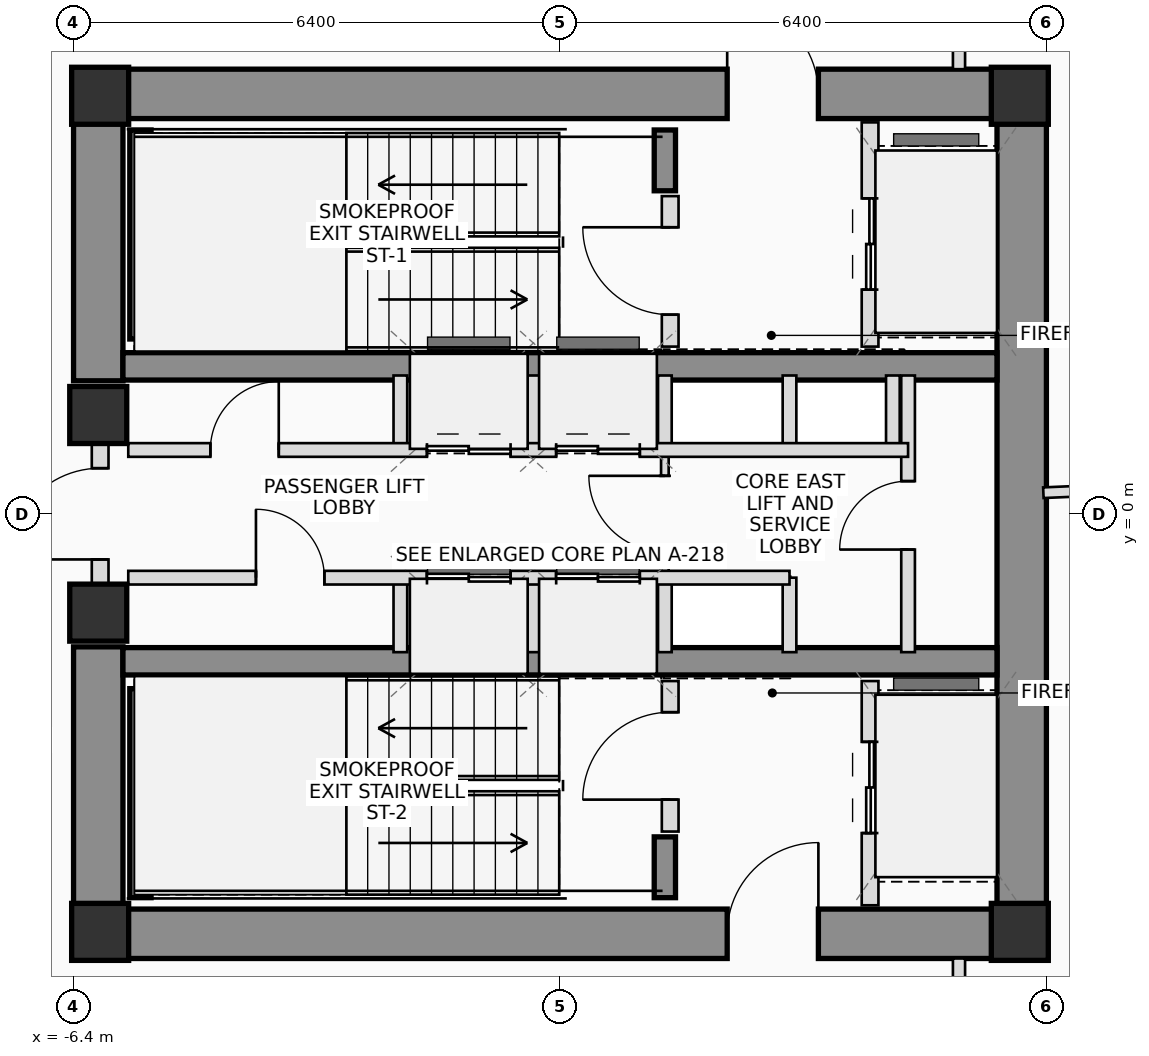
"""IFC4 building model, lengths in metres.
Left out: names, types, materials, properties, quantities, classifications, styles, units other than length and angle.
Written with IfcOpenShell. Run it as: python <this file> out.ifc"""

import sys

from ifc_helpers import new_model, si_unit, direction, frame, frame_2d, origin, origin_2d, place, context, subcontext, project, spatial, rectangle, extrude, source, transform, mapped, element, fill, save


model = new_model("IFC4")
c1 = context("Model", 3, precision=1e-05, world=origin(), true_north=direction((0.0, 1.0)))
c2 = subcontext(c1, "Body", "Model", "MODEL_VIEW")
j1 = project(units=[si_unit("LENGTHUNIT", "METRE"), si_unit("PLANEANGLEUNIT", "RADIAN")], contexts=[c1])
p1 = place(None, origin())
s1 = spatial("IfcSite", under=j1, at=p1, CompositionType="ELEMENT")
p2 = place(p1, origin())
s2 = spatial("IfcBuilding", under=s1, at=p2, CompositionType="ELEMENT")
p3 = place(p2, frame((0.0, 0.0, 205.25)))
s3 = spatial("IfcBuildingStorey", under=s2, at=p3, CompositionType="ELEMENT", Elevation=205.25)
m1 = source(origin(), c2, "Body", "SweptSolid", [
    extrude(rectangle(XDim=0.75, YDim=0.75, at=origin_2d()), origin(), (0.0, 0.0, 1.0), 3.45),
])
for number, where, z_axis, x_axis in (
    (1, (-6.05, -5.5, 0.0), (0.0, 0.0, 1.0), (1.0, 0.0, 0.0)),
    (2, (6.05, -5.5, 0.0), (0.0, 0.0, 1.0), (1.0, 0.0, 0.0)),
    (3, (6.05, 5.5, 0.0), (0.0, 0.0, 1.0), (1.0, 0.0, 0.0)),
    (4, (-6.05, 5.5, 0.0), (0.0, 0.0, 1.0), (1.0, 0.0, 0.0)),
):
    element("IfcColumn", number, at=place(p3, frame(where, z_axis=z_axis, x_axis=x_axis)), inside=s3, PredefinedType="COLUMN", context=c2, shape_type="MappedRepresentation", body=[
        mapped(m1, transform((0.0, 0.0, 0.0), scale=1.0)),
    ])
p4 = place(p3, frame((-6.4, 5.525, 0.0), z_axis=(0.0, 0.0, 1.0), x_axis=(1.0, 0.0, 0.0)))
e5 = element("IfcWall", 5, at=p4, inside=s3, PredefinedType="SHEAR", context=c2, shape_type="SweptSolid", body=[
    extrude(rectangle(XDim=12.8, YDim=0.65, at=frame_2d((6.4, 0.0))), origin(), (0.0, 0.0, 1.0), 3.45),
])
p5 = place(p4, frame((8.6, 0.0, 0.0)))
e6 = element("IfcOpeningElement", 6, at=p5, cuts=e5, PredefinedType="OPENING", context=c2, shape_type="SweptSolid", body=[
    extrude(rectangle(XDim=1.2, YDim=2.2, at=frame_2d((0.6, 1.1))), frame((0.0, 0.335, 0.0), z_axis=(0.0, -1.0, 0.0), x_axis=(1.0, 0.0, 0.0)), (0.0, 0.0, 1.0), 0.67),
])
p6 = place(p3, frame((-6.4, -5.525, 0.0), z_axis=(0.0, 0.0, 1.0), x_axis=(1.0, 0.0, 0.0)))
e7 = element("IfcWall", 7, at=p6, inside=s3, PredefinedType="SHEAR", context=c2, shape_type="SweptSolid", body=[
    extrude(rectangle(XDim=12.8, YDim=0.65, at=frame_2d((6.4, 0.0))), origin(), (0.0, 0.0, 1.0), 3.45),
])
p7 = place(p6, frame((8.6, 0.0, 0.0)))
e8 = element("IfcOpeningElement", 8, at=p7, cuts=e7, PredefinedType="OPENING", context=c2, shape_type="SweptSolid", body=[
    extrude(rectangle(XDim=1.2, YDim=2.2, at=frame_2d((0.6, 1.1))), frame((0.0, 0.335, 0.0), z_axis=(0.0, -1.0, 0.0), x_axis=(1.0, 0.0, 0.0)), (0.0, 0.0, 1.0), 0.67),
])
p8 = place(p3, frame((6.075, -5.2, 0.0), z_axis=(0.0, 0.0, 1.0), x_axis=(0.0, 1.0, 0.0)))
e9 = element("IfcWall", 9, at=p8, inside=s3, PredefinedType="SHEAR", context=c2, shape_type="SweptSolid", body=[
    extrude(rectangle(XDim=10.4, YDim=0.65, at=frame_2d((5.2, 0.0))), origin(), (0.0, 0.0, 1.0), 3.45),
])
for number, where, z_axis, x_axis in (
    (10, (-6.075, -5.2, 0.0), (0.0, 0.0, 1.0), (0.0, 1.0, 0.0)),
    (11, (-6.075, 1.75, 0.0), (0.0, 0.0, 1.0), (0.0, 1.0, 0.0)),
):
    element("IfcWall", number, at=place(p3, frame(where, z_axis=z_axis, x_axis=x_axis)), inside=s3, PredefinedType="SHEAR", context=c2, shape_type="SweptSolid", body=[
        extrude(rectangle(XDim=3.45, YDim=0.65, at=frame_2d((1.725, 0.0))), origin(), (0.0, 0.0, 1.0), 3.45),
    ])
for number, where, z_axis, x_axis in (
    (12, (-5.75, 1.94, 0.0), (0.0, 0.0, 1.0), (1.0, 0.0, 0.0)),
    (13, (-5.75, -1.94, 0.0), (0.0, 0.0, 1.0), (1.0, 0.0, 0.0)),
):
    element("IfcWall", number, at=place(p3, frame(where, z_axis=z_axis, x_axis=x_axis)), inside=s3, PredefinedType="SHEAR", context=c2, shape_type="SweptSolid", body=[
        extrude(rectangle(XDim=11.5, YDim=0.36, at=frame_2d((5.75, 0.0))), origin(), (0.0, 0.0, 1.0), 3.45),
    ])
p9 = place(p3, frame((-5.52, 2.3, 0.0), z_axis=(0.0, 0.0, 1.0), x_axis=(0.0, 1.0, 0.0)))
e14 = element("IfcWall", 14, at=p9, inside=s3, PredefinedType="SHEAR", context=c2, shape_type="SweptSolid", body=[
    extrude(rectangle(XDim=2.75, YDim=0.28, at=frame_2d((1.375, 0.0))), origin(), (0.0, 0.0, 1.0), 3.45),
])
p10 = place(p3, frame((1.38, 4.25, 0.0), z_axis=(0.0, 0.0, 1.0), x_axis=(0.0, 1.0, 0.0)))
e15 = element("IfcWall", 15, at=p10, inside=s3, PredefinedType="SHEAR", context=c2, shape_type="SweptSolid", body=[
    extrude(rectangle(XDim=0.8, YDim=0.28, at=frame_2d((0.4, 0.0))), origin(), (0.0, 0.0, 1.0), 3.45),
])
p11 = place(p3, frame((-5.52, -5.05, 0.0), z_axis=(0.0, 0.0, 1.0), x_axis=(0.0, 1.0, 0.0)))
e16 = element("IfcWall", 16, at=p11, inside=s3, PredefinedType="SHEAR", context=c2, shape_type="SweptSolid", body=[
    extrude(rectangle(XDim=2.75, YDim=0.28, at=frame_2d((1.375, 0.0))), origin(), (0.0, 0.0, 1.0), 3.45),
])
p12 = place(p3, frame((1.38, -5.05, 0.0), z_axis=(0.0, 0.0, 1.0), x_axis=(0.0, 1.0, 0.0)))
e17 = element("IfcWall", 17, at=p12, inside=s3, PredefinedType="SHEAR", context=c2, shape_type="SweptSolid", body=[
    extrude(rectangle(XDim=0.8, YDim=0.28, at=frame_2d((0.4, 0.0))), origin(), (0.0, 0.0, 1.0), 3.45),
])
for number, where, z_axis, x_axis in (
    (18, (-6.075, -1.3, 0.0), (0.0, 0.0, 1.0), (1.0, 0.0, 0.0)),
    (19, (-6.075, 1.3, 0.0), (0.0, 0.0, 1.0), (1.0, 0.0, 0.0)),
):
    element("IfcColumn", number, at=place(p3, frame(where, z_axis=z_axis, x_axis=x_axis)), inside=s3, PredefinedType="COLUMN", context=c2, shape_type="MappedRepresentation", body=[
        mapped(m1, transform((0.0, 0.0, 0.0), scale=1.0)),
    ])
p13 = place(p3, frame((-6.05, -0.95, 0.0), z_axis=(0.0, 0.0, 1.0), x_axis=(0.0, 1.0, 0.0)))
e20 = element("IfcWall", 20, at=p13, inside=s3, PredefinedType="PLUMBINGWALL", context=c2, shape_type="SweptSolid", body=[
    extrude(rectangle(XDim=1.9, YDim=0.22, at=frame_2d((0.95, 0.0))), origin(), (0.0, 0.0, 1.0), 2.23),
])
p14 = place(p13, frame((0.35, 0.0, 0.0)))
e21 = element("IfcOpeningElement", 21, at=p14, cuts=e20, PredefinedType="OPENING", context=c2, shape_type="SweptSolid", body=[
    extrude(rectangle(XDim=1.2, YDim=2.2, at=frame_2d((0.6, 1.1))), frame((0.0, 0.12, 0.0), z_axis=(0.0, -1.0, 0.0), x_axis=(1.0, 0.0, 0.0)), (0.0, 0.0, 1.0), 0.24),
])
p15 = place(p3, frame((1.45, 2.2, 0.0), z_axis=(0.0, 0.0, 1.0), x_axis=(0.0, 1.0, 0.0)))
e22 = element("IfcWall", 22, at=p15, inside=s3, PredefinedType="PLUMBINGWALL", context=c2, shape_type="SweptSolid", body=[
    extrude(rectangle(XDim=1.98, YDim=0.22, at=frame_2d((0.99, 0.0))), origin(), (0.0, 0.0, 1.0), 3.25),
])
p16 = place(p15, frame((0.42, 0.0, 0.0)))
e23 = element("IfcOpeningElement", 23, at=p16, cuts=e22, PredefinedType="OPENING", context=c2, shape_type="SweptSolid", body=[
    extrude(rectangle(XDim=1.15, YDim=2.15, at=frame_2d((0.575, 1.075))), frame((0.0, 0.12, 0.0), z_axis=(0.0, -1.0, 0.0), x_axis=(1.0, 0.0, 0.0)), (0.0, 0.0, 1.0), 0.24),
])
p17 = place(p3, frame((4.08, 2.2, 0.0), z_axis=(0.0, 0.0, 1.0), x_axis=(0.0, 1.0, 0.0)))
e24 = element("IfcWall", 24, at=p17, inside=s3, PredefinedType="PLUMBINGWALL", context=c2, shape_type="SweptSolid", body=[
    extrude(rectangle(XDim=2.95, YDim=0.22, at=frame_2d((1.475, 0.0))), origin(), (0.0, 0.0, 1.0), 3.25),
])
p18 = place(p17, frame((0.75, 0.0, 0.0)))
e25 = element("IfcOpeningElement", 25, at=p18, cuts=e24, PredefinedType="OPENING", context=c2, shape_type="SweptSolid", body=[
    extrude(rectangle(XDim=1.2, YDim=2.25, at=frame_2d((0.6, 1.125))), frame((0.0, 0.12, 0.0), z_axis=(0.0, -1.0, 0.0), x_axis=(1.0, 0.0, 0.0)), (0.0, 0.0, 1.0), 0.24),
])
p19 = place(p3, frame((1.45, -4.18, 0.0), z_axis=(0.0, 0.0, 1.0), x_axis=(0.0, 1.0, 0.0)))
e26 = element("IfcWall", 26, at=p19, inside=s3, PredefinedType="PLUMBINGWALL", context=c2, shape_type="SweptSolid", body=[
    extrude(rectangle(XDim=1.98, YDim=0.22, at=frame_2d((0.99, 0.0))), origin(), (0.0, 0.0, 1.0), 3.25),
])
p20 = place(p19, frame((0.42, 0.0, 0.0)))
e27 = element("IfcOpeningElement", 27, at=p20, cuts=e26, PredefinedType="OPENING", context=c2, shape_type="SweptSolid", body=[
    extrude(rectangle(XDim=1.15, YDim=2.15, at=frame_2d((0.575, 1.075))), frame((0.0, 0.12, 0.0), z_axis=(0.0, -1.0, 0.0), x_axis=(1.0, 0.0, 0.0)), (0.0, 0.0, 1.0), 0.24),
])
p21 = place(p3, frame((4.08, -5.15, 0.0), z_axis=(0.0, 0.0, 1.0), x_axis=(0.0, 1.0, 0.0)))
e28 = element("IfcWall", 28, at=p21, inside=s3, PredefinedType="PLUMBINGWALL", context=c2, shape_type="SweptSolid", body=[
    extrude(rectangle(XDim=2.95, YDim=0.22, at=frame_2d((1.475, 0.0))), origin(), (0.0, 0.0, 1.0), 3.25),
])
p22 = place(p21, frame((0.95, 0.0, 0.0)))
e29 = element("IfcOpeningElement", 29, at=p22, cuts=e28, PredefinedType="OPENING", context=c2, shape_type="SweptSolid", body=[
    extrude(rectangle(XDim=1.2, YDim=2.25, at=frame_2d((0.6, 1.125))), frame((0.0, 0.12, 0.0), z_axis=(0.0, -1.0, 0.0), x_axis=(1.0, 0.0, 0.0)), (0.0, 0.0, 1.0), 0.24),
])
p23 = place(p3, frame((1.38, -0.84, 0.0), z_axis=(0.0, 0.0, 1.0), x_axis=(0.0, 1.0, 0.0)))
e30 = element("IfcWall", 30, at=p23, inside=s3, PredefinedType="PARTITIONING", context=c2, shape_type="SweptSolid", body=[
    extrude(rectangle(XDim=1.68, YDim=0.1, at=frame_2d((0.84, 0.0))), origin(), (0.0, 0.0, 1.0), 3.25),
])
p24 = place(p23, frame((0.34, 0.0, 0.0)))
e31 = element("IfcOpeningElement", 31, at=p24, cuts=e30, PredefinedType="OPENING", context=c2, shape_type="SweptSolid", body=[
    extrude(rectangle(XDim=1.0, YDim=2.25, at=frame_2d((0.5, 1.125))), frame((0.0, 0.06, 0.0), z_axis=(0.0, -1.0, 0.0), x_axis=(1.0, 0.0, 0.0)), (0.0, 0.0, 1.0), 0.12),
])
for number, where, z_axis, x_axis in (
    (32, (-2.1, 0.84, 0.0), (0.0, 0.0, 1.0), (0.0, 1.0, 0.0)),
    (33, (-2.1, -1.82, 0.0), (0.0, 0.0, 1.0), (0.0, 1.0, 0.0)),
    (34, (-0.35, 0.84, 0.0), (0.0, 0.0, 1.0), (0.0, 1.0, 0.0)),
    (35, (-0.35, -1.82, 0.0), (0.0, 0.0, 1.0), (0.0, 1.0, 0.0)),
    (36, (1.38, 0.84, 0.0), (0.0, 0.0, 1.0), (0.0, 1.0, 0.0)),
    (37, (1.38, -1.82, 0.0), (0.0, 0.0, 1.0), (0.0, 1.0, 0.0)),
    (38, (3.02, 0.84, 0.0), (0.0, 0.0, 1.0), (0.0, 1.0, 0.0)),
    (39, (4.38, 0.84, 0.0), (0.0, 0.0, 1.0), (0.0, 1.0, 0.0)),
    (40, (3.02, -1.82, 0.0), (0.0, 0.0, 1.0), (0.0, 1.0, 0.0)),
):
    element("IfcWall", number, at=place(p3, frame(where, z_axis=z_axis, x_axis=x_axis)), inside=s3, PredefinedType="PLUMBINGWALL", context=c2, shape_type="SweptSolid", body=[
        extrude(rectangle(XDim=0.98, YDim=0.18, at=frame_2d((0.49, 0.0))), origin(), (0.0, 0.0, 1.0), 3.25),
    ])
p25 = place(p3, frame((4.58, -1.82, 0.0), z_axis=(0.0, 0.0, 1.0), x_axis=(0.0, 1.0, 0.0)))
e41 = element("IfcWall", 41, at=p25, inside=s3, PredefinedType="PLUMBINGWALL", context=c2, shape_type="SweptSolid", body=[
    extrude(rectangle(XDim=3.64, YDim=0.18, at=frame_2d((1.82, 0.0))), origin(), (0.0, 0.0, 1.0), 3.25),
])
p26 = place(p25, frame((1.35, 0.0, 0.0)))
e42 = element("IfcOpeningElement", 42, at=p26, cuts=e41, PredefinedType="OPENING", context=c2, shape_type="SweptSolid", body=[
    extrude(rectangle(XDim=0.9, YDim=2.05, at=frame_2d((0.45, 1.025))), frame((0.0, 0.1, 0.0), z_axis=(0.0, -1.0, 0.0), x_axis=(1.0, 0.0, 0.0)), (0.0, 0.0, 1.0), 0.2),
])
p27 = place(p3, frame((-5.68, 0.84, 0.0), z_axis=(0.0, 0.0, 1.0), x_axis=(1.0, 0.0, 0.0)))
e43 = element("IfcWall", 43, at=p27, inside=s3, PredefinedType="PLUMBINGWALL", context=c2, shape_type="SweptSolid", body=[
    extrude(rectangle(XDim=10.26, YDim=0.18, at=frame_2d((5.13, 0.0))), origin(), (0.0, 0.0, 1.0), 3.25),
])
p28 = place(p27, frame((1.08, 0.0, 0.0)))
e44 = element("IfcOpeningElement", 44, at=p28, cuts=e43, PredefinedType="OPENING", context=c2, shape_type="SweptSolid", body=[
    extrude(rectangle(XDim=0.9, YDim=2.05, at=frame_2d((0.45, 1.025))), frame((0.0, 0.1, 0.0), z_axis=(0.0, -1.0, 0.0), x_axis=(1.0, 0.0, 0.0)), (0.0, 0.0, 1.0), 0.2),
])
p29 = place(p27, frame((3.93, 0.0, 0.0)))
e45 = element("IfcOpeningElement", 45, at=p29, cuts=e43, PredefinedType="OPENING", context=c2, shape_type="SweptSolid", body=[
    extrude(rectangle(XDim=1.1, YDim=2.2, at=frame_2d((0.55, 1.1))), frame((0.0, 0.1, 0.0), z_axis=(0.0, -1.0, 0.0), x_axis=(1.0, 0.0, 0.0)), (0.0, 0.0, 1.0), 0.2),
])
p30 = place(p27, frame((5.63, 0.0, 0.0)))
e46 = element("IfcOpeningElement", 46, at=p30, cuts=e43, PredefinedType="OPENING", context=c2, shape_type="SweptSolid", body=[
    extrude(rectangle(XDim=1.1, YDim=2.2, at=frame_2d((0.55, 1.1))), frame((0.0, 0.1, 0.0), z_axis=(0.0, -1.0, 0.0), x_axis=(1.0, 0.0, 0.0)), (0.0, 0.0, 1.0), 0.2),
])
p31 = place(p3, frame((-5.68, -0.84, 0.0), z_axis=(0.0, 0.0, 1.0), x_axis=(1.0, 0.0, 0.0)))
e47 = element("IfcWall", 47, at=p31, inside=s3, PredefinedType="PLUMBINGWALL", context=c2, shape_type="SweptSolid", body=[
    extrude(rectangle(XDim=8.7, YDim=0.18, at=frame_2d((4.35, 0.0))), origin(), (0.0, 0.0, 1.0), 3.25),
])
p32 = place(p31, frame((1.68, 0.0, 0.0)))
e48 = element("IfcOpeningElement", 48, at=p32, cuts=e47, PredefinedType="OPENING", context=c2, shape_type="SweptSolid", body=[
    extrude(rectangle(XDim=0.9, YDim=2.05, at=frame_2d((0.45, 1.025))), frame((0.0, 0.1, 0.0), z_axis=(0.0, -1.0, 0.0), x_axis=(1.0, 0.0, 0.0)), (0.0, 0.0, 1.0), 0.2),
])
p33 = place(p31, frame((3.93, 0.0, 0.0)))
e49 = element("IfcOpeningElement", 49, at=p33, cuts=e47, PredefinedType="OPENING", context=c2, shape_type="SweptSolid", body=[
    extrude(rectangle(XDim=1.1, YDim=2.2, at=frame_2d((0.55, 1.1))), frame((0.0, 0.1, 0.0), z_axis=(0.0, -1.0, 0.0), x_axis=(1.0, 0.0, 0.0)), (0.0, 0.0, 1.0), 0.2),
])
p34 = place(p31, frame((5.63, 0.0, 0.0)))
e50 = element("IfcOpeningElement", 50, at=p34, cuts=e47, PredefinedType="OPENING", context=c2, shape_type="SweptSolid", body=[
    extrude(rectangle(XDim=1.1, YDim=2.2, at=frame_2d((0.55, 1.1))), frame((0.0, 0.1, 0.0), z_axis=(0.0, -1.0, 0.0), x_axis=(1.0, 0.0, 0.0)), (0.0, 0.0, 1.0), 0.2),
])
p35 = place(p3, frame((5.25, 7.55, 0.0), z_axis=(0.0, 0.0, 1.0), x_axis=(0.0, -1.0, 0.0)))
e51 = element("IfcWall", 51, at=p35, inside=s3, PredefinedType="PARTITIONING", context=c2, shape_type="SweptSolid", body=[
    extrude(rectangle(XDim=1.7, YDim=0.16, at=frame_2d((0.85, 0.0))), origin(), (0.0, 0.0, 1.0), 2.605),
])
p36 = place(p3, frame((5.25, -5.85, 0.0), z_axis=(0.0, 0.0, 1.0), x_axis=(0.0, -1.0, 0.0)))
e52 = element("IfcWall", 52, at=p36, inside=s3, PredefinedType="PARTITIONING", context=c2, shape_type="SweptSolid", body=[
    extrude(rectangle(XDim=1.7, YDim=0.16, at=frame_2d((0.85, 0.0))), origin(), (0.0, 0.0, 1.0), 3.25),
])
p37 = place(p3, frame((6.36, 0.278, 0.0), z_axis=(0.0, 0.0, 1.0), x_axis=(0.999047440648, 0.043637270025, 0.0)))
e53 = element("IfcWall", 53, at=p37, inside=s3, PredefinedType="PARTITIONING", context=c2, shape_type="SweptSolid", body=[
    extrude(rectangle(XDim=8.633, YDim=0.14, at=frame_2d((4.316, 0.0))), origin(), (0.0, 0.0, 1.0), 2.605),
])
p38 = place(p5, origin())
e54 = element("IfcDoor", 54, at=p38, inside=s3, OperationType="SINGLE_SWING_LEFT", PredefinedType="DOOR", context=c2, shape_type="SweptSolid", body=[
    extrude(rectangle(XDim=1.2, YDim=2.2, at=frame_2d((0.6, 1.1))), frame((0.0, 0.025, 0.0), z_axis=(0.0, -1.0, 0.0), x_axis=(1.0, 0.0, 0.0)), (0.0, 0.0, 1.0), 0.05),
])
fill(e6, e54)
p39 = place(p7, origin())
e55 = element("IfcDoor", 55, at=p39, inside=s3, OperationType="SINGLE_SWING_RIGHT", PredefinedType="DOOR", context=c2, shape_type="SweptSolid", body=[
    extrude(rectangle(XDim=1.2, YDim=2.2, at=frame_2d((0.6, 1.1))), frame((0.0, 0.025, 0.0), z_axis=(0.0, -1.0, 0.0), x_axis=(1.0, 0.0, 0.0)), (0.0, 0.0, 1.0), 0.05),
])
fill(e8, e55)
p40 = place(p14, origin())
e56 = element("IfcDoor", 56, at=p40, inside=s3, OperationType="SINGLE_SWING_LEFT", PredefinedType="DOOR", context=c2, shape_type="SweptSolid", body=[
    extrude(rectangle(XDim=1.2, YDim=2.2, at=frame_2d((0.6, 1.1))), frame((0.0, 0.025, 0.0), z_axis=(0.0, -1.0, 0.0), x_axis=(1.0, 0.0, 0.0)), (0.0, 0.0, 1.0), 0.05),
])
fill(e21, e56)
p41 = place(p16, origin())
e57 = element("IfcDoor", 57, at=p41, inside=s3, OperationType="SINGLE_SWING_RIGHT", PredefinedType="DOOR", context=c2, shape_type="SweptSolid", body=[
    extrude(rectangle(XDim=1.15, YDim=2.15, at=frame_2d((0.575, 1.075))), frame((0.0, 0.025, 0.0), z_axis=(0.0, -1.0, 0.0), x_axis=(1.0, 0.0, 0.0)), (0.0, 0.0, 1.0), 0.05),
])
fill(e23, e57)
p42 = place(p18, origin())
e58 = element("IfcDoor", 58, at=p42, inside=s3, OperationType="DOUBLE_DOOR_SLIDING", PredefinedType="DOOR", context=c2, shape_type="SweptSolid", body=[
    extrude(rectangle(XDim=1.2, YDim=2.25, at=frame_2d((0.6, 1.125))), frame((0.0, 0.025, 0.0), z_axis=(0.0, -1.0, 0.0), x_axis=(1.0, 0.0, 0.0)), (0.0, 0.0, 1.0), 0.05),
])
fill(e25, e58)
p43 = place(p20, origin())
e59 = element("IfcDoor", 59, at=p43, inside=s3, OperationType="SINGLE_SWING_LEFT", PredefinedType="DOOR", context=c2, shape_type="SweptSolid", body=[
    extrude(rectangle(XDim=1.15, YDim=2.15, at=frame_2d((0.575, 1.075))), frame((0.0, 0.025, 0.0), z_axis=(0.0, -1.0, 0.0), x_axis=(1.0, 0.0, 0.0)), (0.0, 0.0, 1.0), 0.05),
])
fill(e27, e59)
p44 = place(p22, origin())
e60 = element("IfcDoor", 60, at=p44, inside=s3, OperationType="DOUBLE_DOOR_SLIDING", PredefinedType="DOOR", context=c2, shape_type="SweptSolid", body=[
    extrude(rectangle(XDim=1.2, YDim=2.25, at=frame_2d((0.6, 1.125))), frame((0.0, 0.025, 0.0), z_axis=(0.0, -1.0, 0.0), x_axis=(1.0, 0.0, 0.0)), (0.0, 0.0, 1.0), 0.05),
])
fill(e29, e60)
p45 = place(p24, origin())
e61 = element("IfcDoor", 61, at=p45, inside=s3, OperationType="SINGLE_SWING_RIGHT", PredefinedType="DOOR", context=c2, shape_type="SweptSolid", body=[
    extrude(rectangle(XDim=1.0, YDim=2.25, at=frame_2d((0.5, 1.125))), frame((0.0, 0.025, 0.0), z_axis=(0.0, -1.0, 0.0), x_axis=(1.0, 0.0, 0.0)), (0.0, 0.0, 1.0), 0.05),
])
fill(e31, e61)
p46 = place(p26, origin())
e62 = element("IfcDoor", 62, at=p46, inside=s3, OperationType="SINGLE_SWING_LEFT", PredefinedType="DOOR", context=c2, shape_type="SweptSolid", body=[
    extrude(rectangle(XDim=0.9, YDim=2.05, at=frame_2d((0.45, 1.025))), frame((0.0, 0.025, 0.0), z_axis=(0.0, -1.0, 0.0), x_axis=(1.0, 0.0, 0.0)), (0.0, 0.0, 1.0), 0.05),
])
fill(e42, e62)
p47 = place(p28, origin())
e63 = element("IfcDoor", 63, at=p47, inside=s3, OperationType="SINGLE_SWING_RIGHT", PredefinedType="DOOR", context=c2, shape_type="SweptSolid", body=[
    extrude(rectangle(XDim=0.9, YDim=2.05, at=frame_2d((0.45, 1.025))), frame((0.0, 0.025, 0.0), z_axis=(0.0, -1.0, 0.0), x_axis=(1.0, 0.0, 0.0)), (0.0, 0.0, 1.0), 0.05),
])
fill(e44, e63)
p48 = place(p29, origin())
e64 = element("IfcDoor", 64, at=p48, inside=s3, OperationType="DOUBLE_DOOR_SLIDING", PredefinedType="DOOR", context=c2, shape_type="SweptSolid", body=[
    extrude(rectangle(XDim=1.1, YDim=2.2, at=frame_2d((0.55, 1.1))), frame((0.0, 0.025, 0.0), z_axis=(0.0, -1.0, 0.0), x_axis=(1.0, 0.0, 0.0)), (0.0, 0.0, 1.0), 0.05),
])
fill(e45, e64)
p49 = place(p30, origin())
e65 = element("IfcDoor", 65, at=p49, inside=s3, OperationType="DOUBLE_DOOR_SLIDING", PredefinedType="DOOR", context=c2, shape_type="SweptSolid", body=[
    extrude(rectangle(XDim=1.1, YDim=2.2, at=frame_2d((0.55, 1.1))), frame((0.0, 0.025, 0.0), z_axis=(0.0, -1.0, 0.0), x_axis=(1.0, 0.0, 0.0)), (0.0, 0.0, 1.0), 0.05),
])
fill(e46, e65)
p50 = place(p32, origin())
e66 = element("IfcDoor", 66, at=p50, inside=s3, OperationType="SINGLE_SWING_LEFT", PredefinedType="DOOR", context=c2, shape_type="SweptSolid", body=[
    extrude(rectangle(XDim=0.9, YDim=2.05, at=frame_2d((0.45, 1.025))), frame((0.0, 0.025, 0.0), z_axis=(0.0, -1.0, 0.0), x_axis=(1.0, 0.0, 0.0)), (0.0, 0.0, 1.0), 0.05),
])
fill(e48, e66)
p51 = place(p33, origin())
e67 = element("IfcDoor", 67, at=p51, inside=s3, OperationType="DOUBLE_DOOR_SLIDING", PredefinedType="DOOR", context=c2, shape_type="SweptSolid", body=[
    extrude(rectangle(XDim=1.1, YDim=2.2, at=frame_2d((0.55, 1.1))), frame((0.0, 0.025, 0.0), z_axis=(0.0, -1.0, 0.0), x_axis=(1.0, 0.0, 0.0)), (0.0, 0.0, 1.0), 0.05),
])
fill(e49, e67)
p52 = place(p34, origin())
e68 = element("IfcDoor", 68, at=p52, inside=s3, OperationType="DOUBLE_DOOR_SLIDING", PredefinedType="DOOR", context=c2, shape_type="SweptSolid", body=[
    extrude(rectangle(XDim=1.1, YDim=2.2, at=frame_2d((0.55, 1.1))), frame((0.0, 0.025, 0.0), z_axis=(0.0, -1.0, 0.0), x_axis=(1.0, 0.0, 0.0)), (0.0, 0.0, 1.0), 0.05),
])
fill(e50, e68)
save(model, sys.argv[1])
